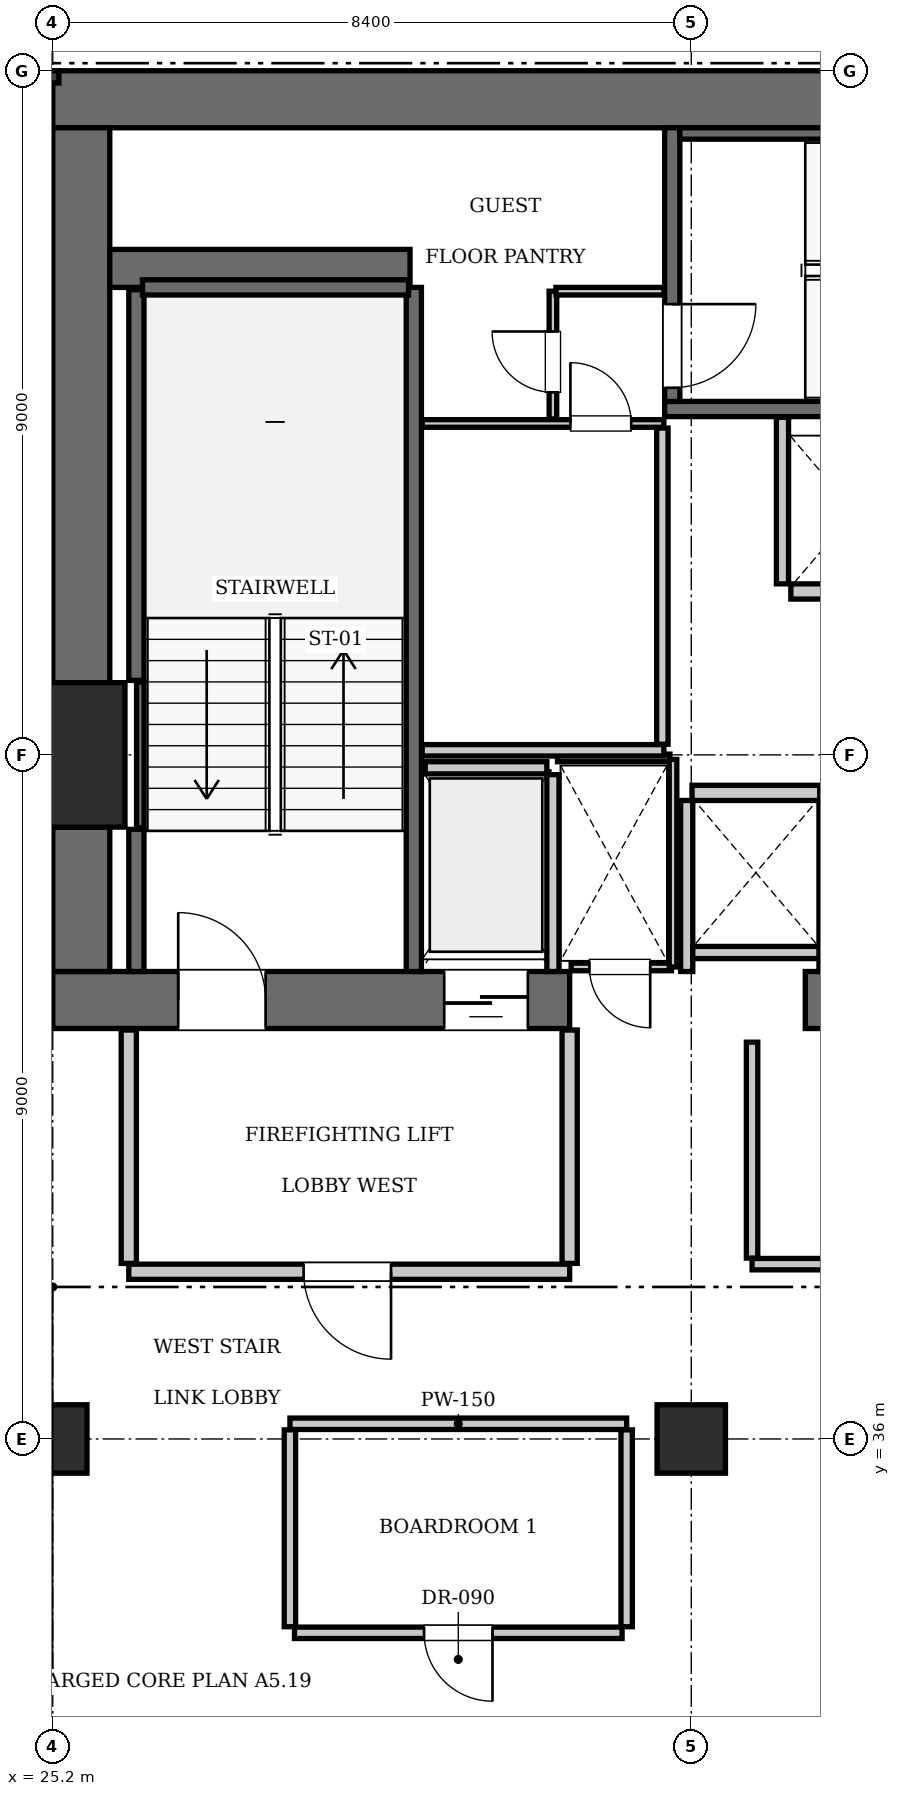
"""IFC4 building model, lengths in metres.
Left out: names, types, materials, properties, quantities, classifications, styles, units other than length and angle.
Written with IfcOpenShell. Run it as: python <this file> out.ifc"""

import sys

from ifc_helpers import new_model, si_unit, direction, frame, frame_2d, origin, origin_2d, place, context, subcontext, project, spatial, rectangle, extrude, element, fill, save


model = new_model("IFC4")
c1 = context("Model", 3, precision=1e-05, world=origin(), true_north=direction((0.0, 1.0)))
c2 = subcontext(c1, "Body", "Model", "MODEL_VIEW")
j1 = project(units=[si_unit("LENGTHUNIT", "METRE"), si_unit("PLANEANGLEUNIT", "RADIAN")], contexts=[c1])
p1 = place(None, origin())
s1 = spatial("IfcSite", under=j1, at=p1, CompositionType="ELEMENT")
p2 = place(p1, origin())
s2 = spatial("IfcBuilding", under=s1, at=p2, CompositionType="ELEMENT")
p3 = place(p2, frame((0.0, 0.0, 215.95)))
s3 = spatial("IfcBuildingStorey", under=s2, at=p3, CompositionType="ELEMENT", Elevation=215.95)
p4 = place(p3, frame((25.2, 45.0, 0.0), z_axis=(0.0, 0.0, 1.0), x_axis=(1.0, 0.0, 0.0)))
e1 = element("IfcColumn", 1, at=p4, inside=s3, PredefinedType="COLUMN", context=c2, shape_type="SweptSolid", body=[
    extrude(rectangle(XDim=1.9, YDim=1.9, at=origin_2d()), origin(), (0.0, 0.0, 1.0), 3.85),
])
p5 = place(p3, frame((25.2, 53.625, 0.0), z_axis=(0.0, 0.0, 1.0), x_axis=(1.0, 0.0, 0.0)))
e2 = element("IfcWall", 2, at=p5, inside=s3, PredefinedType="SHEAR", context=c2, shape_type="SweptSolid", body=[
    extrude(rectangle(XDim=25.2, YDim=0.75, at=frame_2d((12.6, 0.0))), origin(), (0.0, 0.0, 1.0), 3.85),
])
p6 = place(p3, frame((25.2, 41.775, 0.0), z_axis=(0.0, 0.0, 1.0), x_axis=(1.0, 0.0, 0.0)))
e3 = element("IfcWall", 3, at=p6, inside=s3, PredefinedType="SHEAR", context=c2, shape_type="SweptSolid", body=[
    extrude(rectangle(XDim=6.8, YDim=0.75, at=frame_2d((3.4, 0.0))), origin(), (0.0, 0.0, 1.0), 3.85),
])
p7 = place(p6, frame((1.65, 0.0, 0.0)))
e4 = element("IfcOpeningElement", 4, at=p7, cuts=e3, PredefinedType="OPENING", context=c2, shape_type="SweptSolid", body=[
    extrude(rectangle(XDim=1.15, YDim=2.15, at=frame_2d((0.575, 1.075))), frame((0.0, 0.385, 0.0), z_axis=(0.0, -1.0, 0.0), x_axis=(1.0, 0.0, 0.0)), (0.0, 0.0, 1.0), 0.77),
])
p8 = place(p6, frame((5.15, 0.0, 0.0)))
e5 = element("IfcOpeningElement", 5, at=p8, cuts=e3, PredefinedType="OPENING", context=c2, shape_type="SweptSolid", body=[
    extrude(rectangle(XDim=1.1, YDim=2.2, at=frame_2d((0.55, 1.1))), frame((0.0, 0.385, 0.0), z_axis=(0.0, -1.0, 0.0), x_axis=(1.0, 0.0, 0.0)), (0.0, 0.0, 1.0), 0.77),
])
p9 = place(p3, frame((35.1, 41.775, 0.0), z_axis=(0.0, 0.0, 1.0), x_axis=(1.0, 0.0, 0.0)))
e6 = element("IfcWall", 6, at=p9, inside=s3, PredefinedType="SHEAR", context=c2, shape_type="SweptSolid", body=[
    extrude(rectangle(XDim=5.4, YDim=0.75, at=frame_2d((2.7, 0.0))), origin(), (0.0, 0.0, 1.0), 3.85),
])
p10 = place(p3, frame((25.575, 42.15, 0.0), z_axis=(0.0, 0.0, 1.0), x_axis=(0.0, 1.0, 0.0)))
e7 = element("IfcWall", 7, at=p10, inside=s3, PredefinedType="SHEAR", context=c2, shape_type="SweptSolid", body=[
    extrude(rectangle(XDim=1.9, YDim=0.75, at=frame_2d((0.95, 0.0))), origin(), (0.0, 0.0, 1.0), 3.85),
])
p11 = place(p3, frame((25.575, 45.95, 0.0), z_axis=(0.0, 0.0, 1.0), x_axis=(0.0, 1.0, 0.0)))
e8 = element("IfcWall", 8, at=p11, inside=s3, PredefinedType="SHEAR", context=c2, shape_type="SweptSolid", body=[
    extrude(rectangle(XDim=7.3, YDim=0.75, at=frame_2d((3.65, 0.0))), origin(), (0.0, 0.0, 1.0), 3.85),
])
p12 = place(p3, frame((25.95, 51.4, 0.0), z_axis=(0.0, 0.0, 1.0), x_axis=(1.0, 0.0, 0.0)))
e9 = element("IfcWall", 9, at=p12, inside=s3, PredefinedType="SHEAR", context=c2, shape_type="SweptSolid", body=[
    extrude(rectangle(XDim=3.95, YDim=0.5, at=frame_2d((1.975, 0.0))), origin(), (0.0, 0.0, 1.0), 3.85),
])
for number, where, z_axis, x_axis in (
    (10, (25.2, 36.0, 0.0), (0.0, 0.0, 1.0), (1.0, 0.0, 0.0)),
    (11, (33.6, 36.0, 0.0), (0.0, 0.0, 1.0), (1.0, 0.0, 0.0)),
):
    element("IfcColumn", number, at=place(p3, frame(where, z_axis=z_axis, x_axis=x_axis)), inside=s3, PredefinedType="COLUMN", context=c2, shape_type="SweptSolid", body=[
        extrude(rectangle(XDim=0.9, YDim=0.9, at=origin_2d()), origin(), (0.0, 0.0, 1.0), 3.85),
    ])
p13 = place(p3, frame((29.95, 42.15, 0.0), z_axis=(0.0, 0.0, 1.0), x_axis=(0.0, 1.0, 0.0)))
e12 = element("IfcWall", 12, at=p13, inside=s3, PredefinedType="SOLIDWALL", context=c2, shape_type="SweptSolid", body=[
    extrude(rectangle(XDim=9.0, YDim=0.2, at=frame_2d((4.5, 0.0))), origin(), (0.0, 0.0, 1.0), 3.61),
])
p14 = place(p3, frame((26.3, 42.15, 0.0), z_axis=(0.0, 0.0, 1.0), x_axis=(0.0, 1.0, 0.0)))
e13 = element("IfcWall", 13, at=p14, inside=s3, PredefinedType="SOLIDWALL", context=c2, shape_type="SweptSolid", body=[
    extrude(rectangle(XDim=1.87, YDim=0.2, at=frame_2d((0.935, 0.0))), origin(), (0.0, 0.0, 1.0), 3.61),
])
p15 = place(p3, frame((26.3, 45.98, 0.0), z_axis=(0.0, 0.0, 1.0), x_axis=(0.0, 1.0, 0.0)))
e14 = element("IfcWall", 14, at=p15, inside=s3, PredefinedType="SOLIDWALL", context=c2, shape_type="SweptSolid", body=[
    extrude(rectangle(XDim=5.14, YDim=0.2, at=frame_2d((2.57, 0.0))), origin(), (0.0, 0.0, 1.0), 3.61),
])
p16 = place(p3, frame((26.38, 51.15, 0.0), z_axis=(0.0, 0.0, 1.0), x_axis=(1.0, 0.0, 0.0)))
e15 = element("IfcWall", 15, at=p16, inside=s3, PredefinedType="SOLIDWALL", context=c2, shape_type="SweptSolid", body=[
    extrude(rectangle(XDim=3.5, YDim=0.2, at=frame_2d((1.75, 0.0))), origin(), (0.0, 0.0, 1.0), 3.61),
])
p17 = place(p3, frame((26.352, 44.04, 0.0), z_axis=(0.0, 0.0, 1.0), x_axis=(0.0, 1.0, 0.0)))
e16 = element("IfcWall", 16, at=p17, inside=s3, PredefinedType="SOLIDWALL", context=c2, shape_type="SweptSolid", body=[
    extrude(rectangle(XDim=1.92, YDim=0.1, at=frame_2d((0.96, 0.0))), origin(), (0.0, 0.0, 1.0), 3.61),
])
p18 = place(p3, frame((33.25, 49.55, 0.0), z_axis=(0.0, 0.0, 1.0), x_axis=(1.0, 0.0, 0.0)))
e17 = element("IfcWall", 17, at=p18, inside=s3, PredefinedType="SOLIDWALL", context=c2, shape_type="SweptSolid", body=[
    extrude(rectangle(XDim=9.1, YDim=0.2, at=frame_2d((4.55, 0.0))), origin(), (0.0, 0.0, 1.0), 3.61),
])
p19 = place(p3, frame((33.35, 49.65, 0.0), z_axis=(0.0, 0.0, 1.0), x_axis=(0.0, 1.0, 0.0)))
e18 = element("IfcWall", 18, at=p19, inside=s3, PredefinedType="SOLIDWALL", context=c2, shape_type="SweptSolid", body=[
    extrude(rectangle(XDim=3.6, YDim=0.2, at=frame_2d((1.8, 0.0))), origin(), (0.0, 0.0, 1.0), 3.61),
])
p20 = place(p19, frame((0.18, 0.0, 0.0)))
e19 = element("IfcOpeningElement", 19, at=p20, cuts=e18, PredefinedType="OPENING", context=c2, shape_type="SweptSolid", body=[
    extrude(rectangle(XDim=1.1, YDim=2.15, at=frame_2d((0.55, 1.075))), frame((0.0, 0.11, 0.0), z_axis=(0.0, -1.0, 0.0), x_axis=(1.0, 0.0, 0.0)), (0.0, 0.0, 1.0), 0.22),
])
p21 = place(p3, frame((33.45, 53.175, 0.0), z_axis=(0.0, 0.0, 1.0), x_axis=(1.0, 0.0, 0.0)))
e20 = element("IfcWall", 20, at=p21, inside=s3, PredefinedType="SOLIDWALL", context=c2, shape_type="SweptSolid", body=[
    extrude(rectangle(XDim=8.7, YDim=0.15, at=frame_2d((4.35, 0.0))), origin(), (0.0, 0.0, 1.0), 3.61),
])
p22 = place(p3, frame((34.91, 47.15, 0.0), z_axis=(0.0, 0.0, 1.0), x_axis=(1.0, 0.0, 0.0)))
e21 = element("IfcWall", 21, at=p22, inside=s3, PredefinedType="SOLIDWALL", context=c2, shape_type="SweptSolid", body=[
    extrude(rectangle(XDim=1.68, YDim=0.2, at=frame_2d((0.84, 0.0))), origin(), (0.0, 0.0, 1.0), 3.61),
])
p23 = place(p3, frame((33.61, 44.5, 0.0), z_axis=(0.0, 0.0, 1.0), x_axis=(1.0, 0.0, 0.0)))
e22 = element("IfcWall", 22, at=p23, inside=s3, PredefinedType="SOLIDWALL", context=c2, shape_type="SweptSolid", body=[
    extrude(rectangle(XDim=1.68, YDim=0.2, at=frame_2d((0.84, 0.0))), origin(), (0.0, 0.0, 1.0), 3.61),
])
p24 = place(p3, frame((30.1, 44.83, 0.0), z_axis=(0.0, 0.0, 1.0), x_axis=(1.0, 0.0, 0.0)))
e23 = element("IfcWall", 23, at=p24, inside=s3, PredefinedType="SOLIDWALL", context=c2, shape_type="SweptSolid", body=[
    extrude(rectangle(XDim=1.6, YDim=0.16, at=frame_2d((0.8, 0.0))), origin(), (0.0, 0.0, 1.0), 3.61),
])
p25 = place(p3, frame((31.78, 42.15, 0.0), z_axis=(0.0, 0.0, 1.0), x_axis=(0.0, 1.0, 0.0)))
e24 = element("IfcWall", 24, at=p25, inside=s3, PredefinedType="SOLIDWALL", context=c2, shape_type="SweptSolid", body=[
    extrude(rectangle(XDim=2.59, YDim=0.16, at=frame_2d((1.295, 0.0))), origin(), (0.0, 0.0, 1.0), 3.61),
])
p26 = place(p3, frame((34.8, 47.25, 0.0), z_axis=(0.0, 0.0, 1.0), x_axis=(0.0, 1.0, 0.0)))
e25 = element("IfcWall", 25, at=p26, inside=s3, PredefinedType="SOLIDWALL", context=c2, shape_type="SweptSolid", body=[
    extrude(rectangle(XDim=2.19, YDim=0.16, at=frame_2d((1.095, 0.0))), origin(), (0.0, 0.0, 1.0), 3.61),
])
for number, where, z_axis, x_axis in (
    (26, (33.54, 42.15, 0.0), (0.0, 0.0, 1.0), (0.0, 1.0, 0.0)),
    (27, (35.36, 42.15, 0.0), (0.0, 0.0, 1.0), (0.0, 1.0, 0.0)),
):
    element("IfcWall", number, at=place(p3, frame(where, z_axis=z_axis, x_axis=x_axis)), inside=s3, PredefinedType="SOLIDWALL", context=c2, shape_type="SweptSolid", body=[
        extrude(rectangle(XDim=2.25, YDim=0.16, at=frame_2d((1.125, 0.0))), origin(), (0.0, 0.0, 1.0), 3.61),
    ])
p27 = place(p3, frame((33.62, 42.4, 0.0), z_axis=(0.0, 0.0, 1.0), x_axis=(1.0, 0.0, 0.0)))
e28 = element("IfcWall", 28, at=p27, inside=s3, PredefinedType="SOLIDWALL", context=c2, shape_type="SweptSolid", body=[
    extrude(rectangle(XDim=1.66, YDim=0.16, at=frame_2d((0.83, 0.0))), origin(), (0.0, 0.0, 1.0), 3.61),
])
p28 = place(p3, frame((26.2, 38.2, 0.0), z_axis=(0.0, 0.0, 1.0), x_axis=(1.0, 0.0, 0.0)))
e29 = element("IfcWall", 29, at=p28, inside=s3, PredefinedType="PARTITIONING", context=c2, shape_type="SweptSolid", body=[
    extrude(rectangle(XDim=5.8, YDim=0.2, at=frame_2d((2.9, 0.0))), origin(), (0.0, 0.0, 1.0), 3.61),
])
p29 = place(p28, frame((2.3, 0.0, 0.0)))
e30 = element("IfcOpeningElement", 30, at=p29, cuts=e29, PredefinedType="OPENING", context=c2, shape_type="SweptSolid", body=[
    extrude(rectangle(XDim=1.15, YDim=2.15, at=frame_2d((0.575, 1.075))), frame((0.0, 0.11, 0.0), z_axis=(0.0, -1.0, 0.0), x_axis=(1.0, 0.0, 0.0)), (0.0, 0.0, 1.0), 0.22),
])
for number, where, z_axis, x_axis in (
    (31, (26.2, 38.31, 0.0), (0.0, 0.0, 1.0), (0.0, 1.0, 0.0)),
    (32, (32.0, 38.31, 0.0), (0.0, 0.0, 1.0), (0.0, 1.0, 0.0)),
):
    element("IfcWall", number, at=place(p3, frame(where, z_axis=z_axis, x_axis=x_axis)), inside=s3, PredefinedType="PARTITIONING", context=c2, shape_type="SweptSolid", body=[
        extrude(rectangle(XDim=3.07, YDim=0.2, at=frame_2d((1.535, 0.0))), origin(), (0.0, 0.0, 1.0), 3.61),
    ])
p30 = place(p3, frame((32.02, 42.21, 0.0), z_axis=(0.0, 0.0, 1.0), x_axis=(1.0, 0.0, 0.0)))
e33 = element("IfcWall", 33, at=p30, inside=s3, PredefinedType="PARTITIONING", context=c2, shape_type="SweptSolid", body=[
    extrude(rectangle(XDim=1.32, YDim=0.1, at=frame_2d((0.66, 0.0))), origin(), (0.0, 0.0, 1.0), 3.61),
])
p31 = place(p30, frame((0.24, 0.0, 0.0)))
e34 = element("IfcOpeningElement", 34, at=p31, cuts=e33, PredefinedType="OPENING", context=c2, shape_type="SweptSolid", body=[
    extrude(rectangle(XDim=0.8, YDim=2.05, at=frame_2d((0.4, 1.025))), frame((0.0, 0.06, 0.0), z_axis=(0.0, -1.0, 0.0), x_axis=(1.0, 0.0, 0.0)), (0.0, 0.0, 1.0), 0.12),
])
p32 = place(p3, frame((31.84, 44.96, 0.0), z_axis=(0.0, 0.0, 1.0), x_axis=(1.0, 0.0, 0.0)))
e35 = element("IfcWall", 35, at=p32, inside=s3, PredefinedType="PARTITIONING", context=c2, shape_type="SweptSolid", body=[
    extrude(rectangle(XDim=1.48, YDim=0.1, at=frame_2d((0.74, 0.0))), origin(), (0.0, 0.0, 1.0), 3.61),
])
p33 = place(p3, frame((33.36, 42.21, 0.0), z_axis=(0.0, 0.0, 1.0), x_axis=(0.0, 1.0, 0.0)))
e36 = element("IfcWall", 36, at=p33, inside=s3, PredefinedType="PARTITIONING", context=c2, shape_type="SweptSolid", body=[
    extrude(rectangle(XDim=2.73, YDim=0.1, at=frame_2d((1.365, 0.0))), origin(), (0.0, 0.0, 1.0), 3.61),
])
p34 = place(p3, frame((30.06, 45.06, 0.0), z_axis=(0.0, 0.0, 1.0), x_axis=(1.0, 0.0, 0.0)))
e37 = element("IfcWall", 37, at=p34, inside=s3, PredefinedType="PARTITIONING", context=c2, shape_type="SweptSolid", body=[
    extrude(rectangle(XDim=3.18, YDim=0.15, at=frame_2d((1.59, 0.0))), origin(), (0.0, 0.0, 1.0), 3.61),
])
p35 = place(p3, frame((33.22, 45.14, 0.0), z_axis=(0.0, 0.0, 1.0), x_axis=(0.0, 1.0, 0.0)))
e38 = element("IfcWall", 38, at=p35, inside=s3, PredefinedType="PARTITIONING", context=c2, shape_type="SweptSolid", body=[
    extrude(rectangle(XDim=4.16, YDim=0.15, at=frame_2d((2.08, 0.0))), origin(), (0.0, 0.0, 1.0), 3.61),
])
p36 = place(p3, frame((30.06, 49.36, 0.0), z_axis=(0.0, 0.0, 1.0), x_axis=(1.0, 0.0, 0.0)))
e39 = element("IfcWall", 39, at=p36, inside=s3, PredefinedType="PARTITIONING", context=c2, shape_type="SweptSolid", body=[
    extrude(rectangle(XDim=3.18, YDim=0.1, at=frame_2d((1.59, 0.0))), origin(), (0.0, 0.0, 1.0), 3.61),
])
p37 = place(p36, frame((1.95, 0.0, 0.0)))
e40 = element("IfcOpeningElement", 40, at=p37, cuts=e39, PredefinedType="OPENING", context=c2, shape_type="SweptSolid", body=[
    extrude(rectangle(XDim=0.8, YDim=2.05, at=frame_2d((0.4, 1.025))), frame((0.0, 0.06, 0.0), z_axis=(0.0, -1.0, 0.0), x_axis=(1.0, 0.0, 0.0)), (0.0, 0.0, 1.0), 0.12),
])
p38 = place(p3, frame((31.78, 49.42, 0.0), z_axis=(0.0, 0.0, 1.0), x_axis=(0.0, 1.0, 0.0)))
e41 = element("IfcWall", 41, at=p38, inside=s3, PredefinedType="PARTITIONING", context=c2, shape_type="SweptSolid", body=[
    extrude(rectangle(XDim=1.68, YDim=0.1, at=frame_2d((0.84, 0.0))), origin(), (0.0, 0.0, 1.0), 3.61),
])
p39 = place(p38, frame((0.35, 0.0, 0.0)))
e42 = element("IfcOpeningElement", 42, at=p39, cuts=e41, PredefinedType="OPENING", context=c2, shape_type="SweptSolid", body=[
    extrude(rectangle(XDim=0.8, YDim=2.05, at=frame_2d((0.4, 1.025))), frame((0.0, 0.06, 0.0), z_axis=(0.0, -1.0, 0.0), x_axis=(1.0, 0.0, 0.0)), (0.0, 0.0, 1.0), 0.12),
])
p40 = place(p3, frame((31.82, 51.1, 0.0), z_axis=(0.0, 0.0, 1.0), x_axis=(1.0, 0.0, 0.0)))
e43 = element("IfcWall", 43, at=p40, inside=s3, PredefinedType="PARTITIONING", context=c2, shape_type="SweptSolid", body=[
    extrude(rectangle(XDim=1.42, YDim=0.1, at=frame_2d((0.71, 0.0))), origin(), (0.0, 0.0, 1.0), 3.61),
])
p41 = place(p3, frame((34.4, 38.3, 0.0), z_axis=(0.0, 0.0, 1.0), x_axis=(1.0, 0.0, 0.0)))
e44 = element("IfcWall", 44, at=p41, inside=s3, PredefinedType="PARTITIONING", context=c2, shape_type="SweptSolid", body=[
    extrude(rectangle(XDim=2.88, YDim=0.15, at=frame_2d((1.44, 0.0))), origin(), (0.0, 0.0, 1.0), 3.61),
])
p42 = place(p41, frame((1.0, 0.0, 0.0)))
e45 = element("IfcOpeningElement", 45, at=p42, cuts=e44, PredefinedType="OPENING", context=c2, shape_type="SweptSolid", body=[
    extrude(rectangle(XDim=0.8, YDim=2.05, at=frame_2d((0.4, 1.025))), frame((0.0, 0.085, 0.0), z_axis=(0.0, -1.0, 0.0), x_axis=(1.0, 0.0, 0.0)), (0.0, 0.0, 1.0), 0.17),
])
p43 = place(p3, frame((34.4, 38.38, 0.0), z_axis=(0.0, 0.0, 1.0), x_axis=(0.0, 1.0, 0.0)))
e46 = element("IfcWall", 46, at=p43, inside=s3, PredefinedType="PARTITIONING", context=c2, shape_type="SweptSolid", body=[
    extrude(rectangle(XDim=2.84, YDim=0.15, at=frame_2d((1.42, 0.0))), origin(), (0.0, 0.0, 1.0), 3.61),
])
p44 = place(p3, frame((28.32, 36.2, 0.0), z_axis=(0.0, 0.0, 1.0), x_axis=(1.0, 0.0, 0.0)))
e47 = element("IfcWall", 47, at=p44, inside=s3, PredefinedType="PARTITIONING", context=c2, shape_type="SweptSolid", body=[
    extrude(rectangle(XDim=4.43, YDim=0.15, at=frame_2d((2.215, 0.0))), origin(), (0.0, 0.0, 1.0), 3.61),
])
for number, where, z_axis, x_axis in (
    (48, (28.32, 33.53, 0.0), (0.0, 0.0, 1.0), (0.0, 1.0, 0.0)),
    (49, (32.75, 33.53, 0.0), (0.0, 0.0, 1.0), (0.0, 1.0, 0.0)),
):
    element("IfcWall", number, at=place(p3, frame(where, z_axis=z_axis, x_axis=x_axis)), inside=s3, PredefinedType="PARTITIONING", context=c2, shape_type="SweptSolid", body=[
        extrude(rectangle(XDim=2.59, YDim=0.15, at=frame_2d((1.295, 0.0))), origin(), (0.0, 0.0, 1.0), 3.61),
    ])
p45 = place(p3, frame((28.38, 33.45, 0.0), z_axis=(0.0, 0.0, 1.0), x_axis=(1.0, 0.0, 0.0)))
e50 = element("IfcWall", 50, at=p45, inside=s3, PredefinedType="PARTITIONING", context=c2, shape_type="SweptSolid", body=[
    extrude(rectangle(XDim=4.31, YDim=0.15, at=frame_2d((2.155, 0.0))), origin(), (0.0, 0.0, 1.0), 3.61),
])
p46 = place(p45, frame((1.705, 0.0, 0.0)))
e51 = element("IfcOpeningElement", 51, at=p46, cuts=e50, PredefinedType="OPENING", context=c2, shape_type="SweptSolid", body=[
    extrude(rectangle(XDim=0.9, YDim=2.1, at=frame_2d((0.45, 1.05))), frame((0.0, 0.085, 0.0), z_axis=(0.0, -1.0, 0.0), x_axis=(1.0, 0.0, 0.0)), (0.0, 0.0, 1.0), 0.17),
])
p47 = place(p7, origin())
e52 = element("IfcDoor", 52, at=p47, inside=s3, OperationType="SINGLE_SWING_LEFT", PredefinedType="DOOR", context=c2, shape_type="SweptSolid", body=[
    extrude(rectangle(XDim=1.15, YDim=2.15, at=frame_2d((0.575, 1.075))), frame((0.0, 0.025, 0.0), z_axis=(0.0, -1.0, 0.0), x_axis=(1.0, 0.0, 0.0)), (0.0, 0.0, 1.0), 0.05),
])
fill(e4, e52)
p48 = place(p20, frame((1.1, 0.0, 0.0), z_axis=(0.0, 0.0, 1.0), x_axis=(-1.0, 0.0, 0.0)))
e53 = element("IfcDoor", 53, at=p48, inside=s3, OperationType="SINGLE_SWING_LEFT", PredefinedType="DOOR", context=c2, shape_type="SweptSolid", body=[
    extrude(rectangle(XDim=1.1, YDim=2.15, at=frame_2d((0.55, 1.075))), frame((0.0, 0.025, 0.0), z_axis=(0.0, -1.0, 0.0), x_axis=(1.0, 0.0, 0.0)), (0.0, 0.0, 1.0), 0.05),
])
fill(e19, e53)
p49 = place(p8, frame((1.1, 0.0, 0.0), z_axis=(0.0, 0.0, 1.0), x_axis=(-1.0, 0.0, 0.0)))
e54 = element("IfcDoor", 54, at=p49, inside=s3, OperationType="SLIDING_TO_LEFT", PredefinedType="DOOR", context=c2, shape_type="SweptSolid", body=[
    extrude(rectangle(XDim=1.1, YDim=2.2, at=frame_2d((0.55, 1.1))), frame((0.0, 0.025, 0.0), z_axis=(0.0, -1.0, 0.0), x_axis=(1.0, 0.0, 0.0)), (0.0, 0.0, 1.0), 0.05),
])
fill(e5, e54)
p50 = place(p29, frame((1.15, 0.0, 0.0), z_axis=(0.0, 0.0, 1.0), x_axis=(-1.0, 0.0, 0.0)))
e55 = element("IfcDoor", 55, at=p50, inside=s3, OperationType="SINGLE_SWING_LEFT", PredefinedType="DOOR", context=c2, shape_type="SweptSolid", body=[
    extrude(rectangle(XDim=1.15, YDim=2.15, at=frame_2d((0.575, 1.075))), frame((0.0, 0.025, 0.0), z_axis=(0.0, -1.0, 0.0), x_axis=(1.0, 0.0, 0.0)), (0.0, 0.0, 1.0), 0.05),
])
fill(e30, e55)
p51 = place(p31, frame((0.8, 0.0, 0.0), z_axis=(0.0, 0.0, 1.0), x_axis=(-1.0, 0.0, 0.0)))
e56 = element("IfcDoor", 56, at=p51, inside=s3, OperationType="SINGLE_SWING_LEFT", PredefinedType="DOOR", context=c2, shape_type="SweptSolid", body=[
    extrude(rectangle(XDim=0.8, YDim=2.05, at=frame_2d((0.4, 1.025))), frame((0.0, 0.025, 0.0), z_axis=(0.0, -1.0, 0.0), x_axis=(1.0, 0.0, 0.0)), (0.0, 0.0, 1.0), 0.05),
])
fill(e34, e56)
p52 = place(p37, origin())
e57 = element("IfcDoor", 57, at=p52, inside=s3, OperationType="SINGLE_SWING_LEFT", PredefinedType="DOOR", context=c2, shape_type="SweptSolid", body=[
    extrude(rectangle(XDim=0.8, YDim=2.05, at=frame_2d((0.4, 1.025))), frame((0.0, 0.025, 0.0), z_axis=(0.0, -1.0, 0.0), x_axis=(1.0, 0.0, 0.0)), (0.0, 0.0, 1.0), 0.05),
])
fill(e40, e57)
p53 = place(p39, origin())
e58 = element("IfcDoor", 58, at=p53, inside=s3, OperationType="SINGLE_SWING_RIGHT", PredefinedType="DOOR", context=c2, shape_type="SweptSolid", body=[
    extrude(rectangle(XDim=0.8, YDim=2.05, at=frame_2d((0.4, 1.025))), frame((0.0, 0.025, 0.0), z_axis=(0.0, -1.0, 0.0), x_axis=(1.0, 0.0, 0.0)), (0.0, 0.0, 1.0), 0.05),
])
fill(e42, e58)
p54 = place(p46, frame((0.9, 0.0, 0.0), z_axis=(0.0, 0.0, 1.0), x_axis=(-1.0, 0.0, 0.0)))
e59 = element("IfcDoor", 59, at=p54, inside=s3, OperationType="SINGLE_SWING_LEFT", PredefinedType="DOOR", context=c2, shape_type="SweptSolid", body=[
    extrude(rectangle(XDim=0.9, YDim=2.1, at=frame_2d((0.45, 1.05))), frame((0.0, 0.025, 0.0), z_axis=(0.0, -1.0, 0.0), x_axis=(1.0, 0.0, 0.0)), (0.0, 0.0, 1.0), 0.05),
])
fill(e51, e59)
save(model, sys.argv[1])
